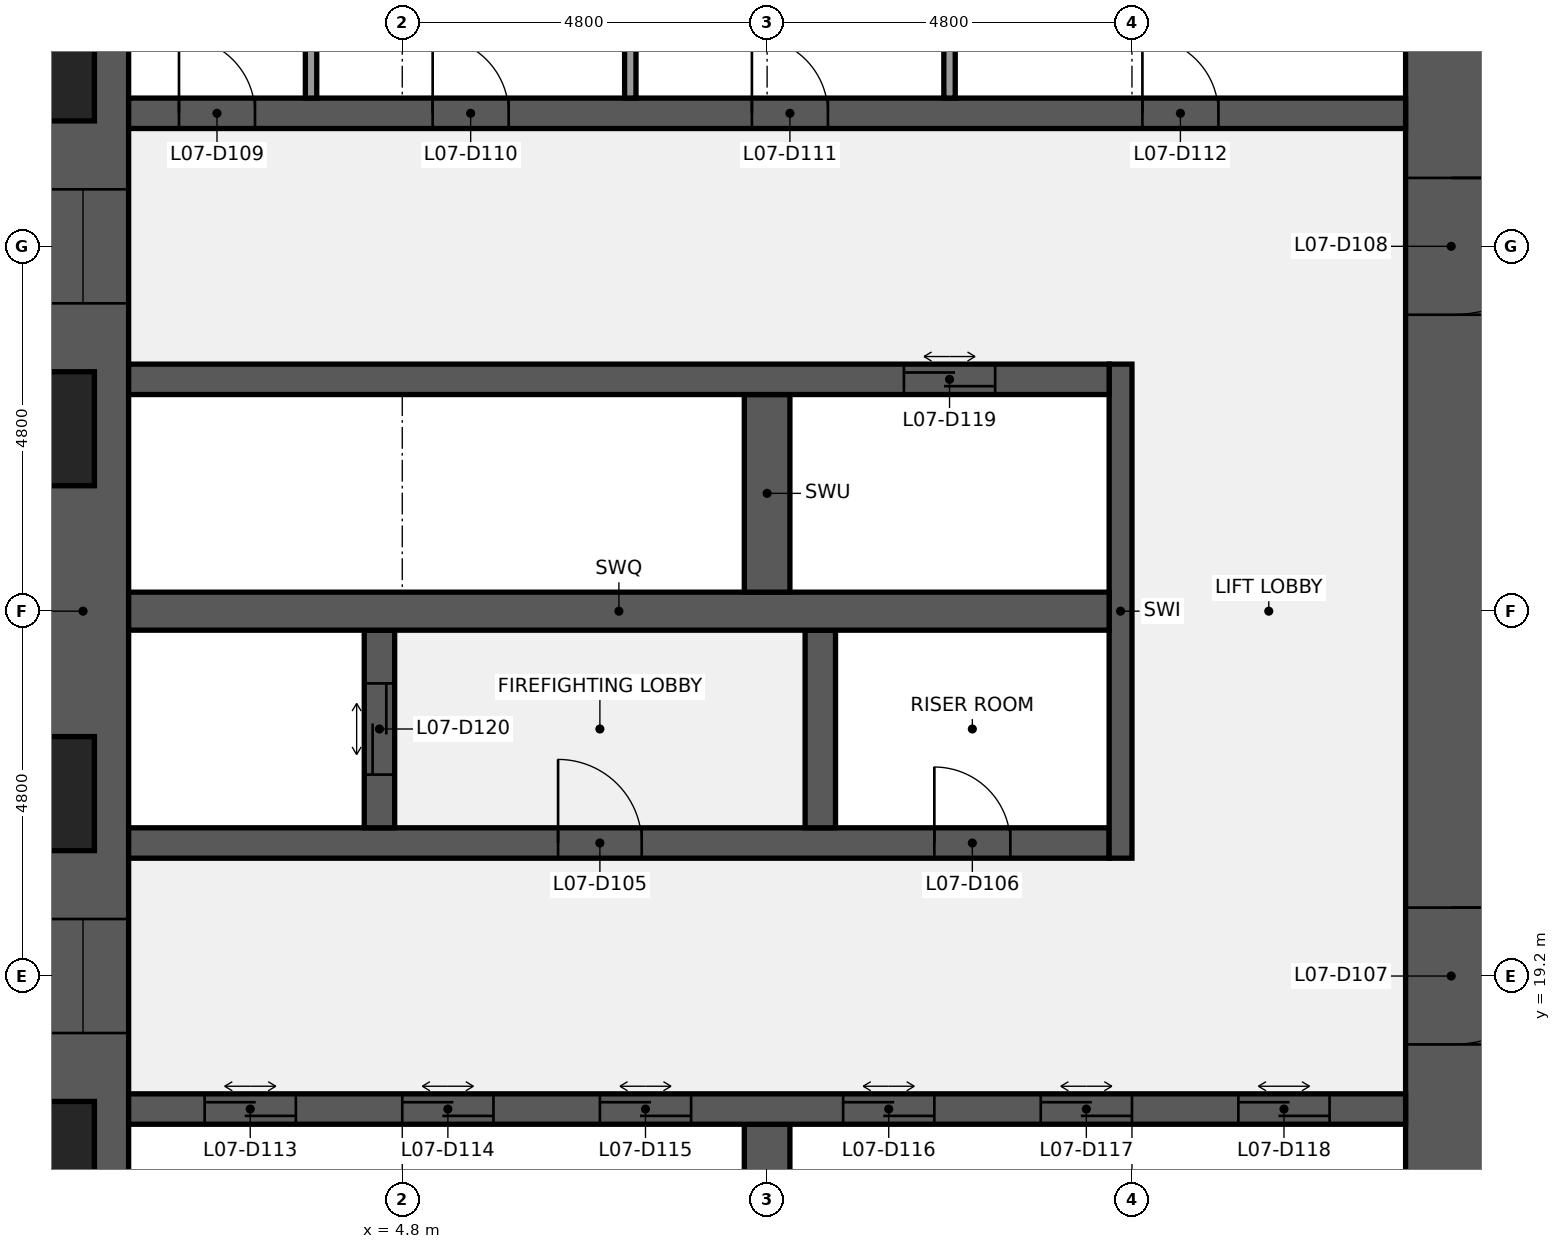
"""IFC4 building model, lengths in metres.
Left out: names, types, materials, properties, quantities, classifications, styles, units other than length and angle.
Written with IfcOpenShell. Run it as: python <this file> out.ifc"""

import sys

from ifc_helpers import new_model, si_unit, direction, frame, frame_2d, origin, place, context, subcontext, project, spatial, rectangle, extrude, element, fill, save


model = new_model("IFC4")
c1 = context("Model", 3, precision=1e-05, world=origin(), true_north=direction((0.0, 1.0)))
c2 = subcontext(c1, "Body", "Model", "MODEL_VIEW")
j1 = project(units=[si_unit("LENGTHUNIT", "METRE"), si_unit("PLANEANGLEUNIT", "RADIAN")], contexts=[c1])
p1 = place(None, origin())
s1 = spatial("IfcSite", under=j1, at=p1, CompositionType="ELEMENT")
p2 = place(p1, origin())
s2 = spatial("IfcBuilding", under=s1, at=p2, CompositionType="ELEMENT")
p3 = place(p2, frame((0.0, 0.0, 39.0)))
s3 = spatial("IfcBuildingStorey", under=s2, at=p3, CompositionType="ELEMENT", Elevation=39.0)
p4 = place(p3, frame((0.6, 9.6, 0.0), z_axis=(0.0, 0.0, 1.0), x_axis=(0.0, 1.0, 0.0)))
e1 = element("IfcWall", 1, at=p4, inside=s3, PredefinedType="SHEAR", context=c2, shape_type="SweptSolid", body=[
    extrude(rectangle(XDim=28.8, YDim=1.2, at=frame_2d((14.4, 0.0))), origin(), (0.0, 0.0, 1.0), 3.84),
])
p5 = place(p4, frame((8.85, 0.0, 0.9)))
e2 = element("IfcOpeningElement", 2, at=p5, cuts=e1, PredefinedType="OPENING", context=c2, shape_type="SweptSolid", body=[
    extrude(rectangle(XDim=1.5, YDim=1.5, at=frame_2d((0.75, 0.75))), frame((0.0, 0.61, 0.0), z_axis=(0.0, -1.0, 0.0), x_axis=(1.0, 0.0, 0.0)), (0.0, 0.0, 1.0), 1.22),
])
p6 = place(p4, frame((18.45, 0.0, 0.9)))
e3 = element("IfcOpeningElement", 3, at=p6, cuts=e1, PredefinedType="OPENING", context=c2, shape_type="SweptSolid", body=[
    extrude(rectangle(XDim=1.5, YDim=1.5, at=frame_2d((0.75, 0.75))), frame((0.0, 0.61, 0.0), z_axis=(0.0, -1.0, 0.0), x_axis=(1.0, 0.0, 0.0)), (0.0, 0.0, 1.0), 1.22),
])
p7 = place(p3, frame((18.6, 38.4, 0.0), z_axis=(0.0, 0.0, 1.0), x_axis=(0.0, -1.0, 0.0)))
e4 = element("IfcWall", 4, at=p7, inside=s3, PredefinedType="SHEAR", context=c2, shape_type="SweptSolid", body=[
    extrude(rectangle(XDim=28.8, YDim=1.2, at=frame_2d((14.4, 0.0))), origin(), (0.0, 0.0, 1.0), 3.84),
])
p8 = place(p7, frame((18.3, 0.0, 0.0)))
e5 = element("IfcOpeningElement", 5, at=p8, cuts=e4, PredefinedType="OPENING", context=c2, shape_type="SweptSolid", body=[
    extrude(rectangle(XDim=1.8, YDim=2.1, at=frame_2d((0.9, 1.05))), frame((0.0, 0.61, 0.0), z_axis=(0.0, -1.0, 0.0), x_axis=(1.0, 0.0, 0.0)), (0.0, 0.0, 1.0), 1.22),
])
p9 = place(p7, frame((8.7, 0.0, 0.0)))
e6 = element("IfcOpeningElement", 6, at=p9, cuts=e4, PredefinedType="OPENING", context=c2, shape_type="SweptSolid", body=[
    extrude(rectangle(XDim=1.8, YDim=2.1, at=frame_2d((0.9, 1.05))), frame((0.0, 0.61, 0.0), z_axis=(0.0, -1.0, 0.0), x_axis=(1.0, 0.0, 0.0)), (0.0, 0.0, 1.0), 1.22),
])
p10 = place(p3, frame((9.6, 14.65, 0.0), z_axis=(0.0, 0.0, 1.0), x_axis=(0.0, 1.0, 0.0)))
e7 = element("IfcWall", 7, at=p10, inside=s3, PredefinedType="SHEAR", context=c2, shape_type="SweptSolid", body=[
    extrude(rectangle(XDim=2.6, YDim=0.6, at=frame_2d((1.3, 0.0))), origin(), (0.0, 0.0, 1.0), 3.84),
])
p11 = place(p3, frame((1.2, 17.45, 0.0), z_axis=(0.0, 0.0, 1.0), x_axis=(1.0, 0.0, 0.0)))
e8 = element("IfcWall", 8, at=p11, inside=s3, PredefinedType="SHEAR", context=c2, shape_type="SweptSolid", body=[
    extrude(rectangle(XDim=16.8, YDim=0.4, at=frame_2d((8.4, 0.0))), origin(), (0.0, 0.0, 1.0), 3.84),
])
p12 = place(p11, frame((1.0, 0.0, 0.0)))
e9 = element("IfcOpeningElement", 9, at=p12, cuts=e8, PredefinedType="OPENING", context=c2, shape_type="SweptSolid", body=[
    extrude(rectangle(XDim=1.2, YDim=2.1, at=frame_2d((0.6, 1.05))), frame((0.0, 0.21, 0.0), z_axis=(0.0, -1.0, 0.0), x_axis=(1.0, 0.0, 0.0)), (0.0, 0.0, 1.0), 0.42),
])
p13 = place(p11, frame((3.6, 0.0, 0.0)))
e10 = element("IfcOpeningElement", 10, at=p13, cuts=e8, PredefinedType="OPENING", context=c2, shape_type="SweptSolid", body=[
    extrude(rectangle(XDim=1.2, YDim=2.1, at=frame_2d((0.6, 1.05))), frame((0.0, 0.21, 0.0), z_axis=(0.0, -1.0, 0.0), x_axis=(1.0, 0.0, 0.0)), (0.0, 0.0, 1.0), 0.42),
])
p14 = place(p11, frame((6.2, 0.0, 0.0)))
e11 = element("IfcOpeningElement", 11, at=p14, cuts=e8, PredefinedType="OPENING", context=c2, shape_type="SweptSolid", body=[
    extrude(rectangle(XDim=1.2, YDim=2.1, at=frame_2d((0.6, 1.05))), frame((0.0, 0.21, 0.0), z_axis=(0.0, -1.0, 0.0), x_axis=(1.0, 0.0, 0.0)), (0.0, 0.0, 1.0), 0.42),
])
p15 = place(p11, frame((9.4, 0.0, 0.0)))
e12 = element("IfcOpeningElement", 12, at=p15, cuts=e8, PredefinedType="OPENING", context=c2, shape_type="SweptSolid", body=[
    extrude(rectangle(XDim=1.2, YDim=2.1, at=frame_2d((0.6, 1.05))), frame((0.0, 0.21, 0.0), z_axis=(0.0, -1.0, 0.0), x_axis=(1.0, 0.0, 0.0)), (0.0, 0.0, 1.0), 0.42),
])
p16 = place(p11, frame((12.0, 0.0, 0.0)))
e13 = element("IfcOpeningElement", 13, at=p16, cuts=e8, PredefinedType="OPENING", context=c2, shape_type="SweptSolid", body=[
    extrude(rectangle(XDim=1.2, YDim=2.1, at=frame_2d((0.6, 1.05))), frame((0.0, 0.21, 0.0), z_axis=(0.0, -1.0, 0.0), x_axis=(1.0, 0.0, 0.0)), (0.0, 0.0, 1.0), 0.42),
])
p17 = place(p11, frame((14.6, 0.0, 0.0)))
e14 = element("IfcOpeningElement", 14, at=p17, cuts=e8, PredefinedType="OPENING", context=c2, shape_type="SweptSolid", body=[
    extrude(rectangle(XDim=1.2, YDim=2.1, at=frame_2d((0.6, 1.05))), frame((0.0, 0.21, 0.0), z_axis=(0.0, -1.0, 0.0), x_axis=(1.0, 0.0, 0.0)), (0.0, 0.0, 1.0), 0.42),
])
p18 = place(p3, frame((1.2, 20.95, 0.0), z_axis=(0.0, 0.0, 1.0), x_axis=(1.0, 0.0, 0.0)))
e15 = element("IfcWall", 15, at=p18, inside=s3, PredefinedType="SHEAR", context=c2, shape_type="SweptSolid", body=[
    extrude(rectangle(XDim=12.9, YDim=0.4, at=frame_2d((6.45, 0.0))), origin(), (0.0, 0.0, 1.0), 3.84),
])
p19 = place(p18, frame((5.65, 0.0, 0.0)))
e16 = element("IfcOpeningElement", 16, at=p19, cuts=e15, PredefinedType="OPENING", context=c2, shape_type="SweptSolid", body=[
    extrude(rectangle(XDim=1.1, YDim=2.1, at=frame_2d((0.55, 1.05))), frame((0.0, 0.21, 0.0), z_axis=(0.0, -1.0, 0.0), x_axis=(1.0, 0.0, 0.0)), (0.0, 0.0, 1.0), 0.42),
])
p20 = place(p18, frame((10.6, 0.0, 0.0)))
e17 = element("IfcOpeningElement", 17, at=p20, cuts=e15, PredefinedType="OPENING", context=c2, shape_type="SweptSolid", body=[
    extrude(rectangle(XDim=1.0, YDim=2.1, at=frame_2d((0.5, 1.05))), frame((0.0, 0.21, 0.0), z_axis=(0.0, -1.0, 0.0), x_axis=(1.0, 0.0, 0.0)), (0.0, 0.0, 1.0), 0.42),
])
p21 = place(p3, frame((14.25, 20.75, 0.0), z_axis=(0.0, 0.0, 1.0), x_axis=(0.0, 1.0, 0.0)))
e18 = element("IfcWall", 18, at=p21, inside=s3, PredefinedType="SHEAR", context=c2, shape_type="SweptSolid", body=[
    extrude(rectangle(XDim=6.5, YDim=0.3, at=frame_2d((3.25, 0.0))), origin(), (0.0, 0.0, 1.0), 3.84),
])
p22 = place(p3, frame((4.5, 21.15, 0.0), z_axis=(0.0, 0.0, 1.0), x_axis=(0.0, 1.0, 0.0)))
e19 = element("IfcWall", 19, at=p22, inside=s3, PredefinedType="SHEAR", context=c2, shape_type="SweptSolid", body=[
    extrude(rectangle(XDim=2.6, YDim=0.4, at=frame_2d((1.3, 0.0))), origin(), (0.0, 0.0, 1.0), 3.84),
])
p23 = place(p22, frame((0.7, 0.0, 0.0)))
e20 = element("IfcOpeningElement", 20, at=p23, cuts=e19, PredefinedType="OPENING", context=c2, shape_type="SweptSolid", body=[
    extrude(rectangle(XDim=1.2, YDim=2.1, at=frame_2d((0.6, 1.05))), frame((0.0, 0.21, 0.0), z_axis=(0.0, -1.0, 0.0), x_axis=(1.0, 0.0, 0.0)), (0.0, 0.0, 1.0), 0.42),
])
p24 = place(p3, frame((10.3, 21.15, 0.0), z_axis=(0.0, 0.0, 1.0), x_axis=(0.0, 1.0, 0.0)))
e21 = element("IfcWall", 21, at=p24, inside=s3, PredefinedType="SHEAR", context=c2, shape_type="SweptSolid", body=[
    extrude(rectangle(XDim=2.6, YDim=0.4, at=frame_2d((1.3, 0.0))), origin(), (0.0, 0.0, 1.0), 3.84),
])
p25 = place(p3, frame((1.2, 24.0, 0.0), z_axis=(0.0, 0.0, 1.0), x_axis=(1.0, 0.0, 0.0)))
e22 = element("IfcWall", 22, at=p25, inside=s3, PredefinedType="SHEAR", context=c2, shape_type="SweptSolid", body=[
    extrude(rectangle(XDim=12.9, YDim=0.5, at=frame_2d((6.45, 0.0))), origin(), (0.0, 0.0, 1.0), 3.84),
])
p26 = place(p3, frame((9.6, 24.25, 0.0), z_axis=(0.0, 0.0, 1.0), x_axis=(0.0, 1.0, 0.0)))
e23 = element("IfcWall", 23, at=p26, inside=s3, PredefinedType="SHEAR", context=c2, shape_type="SweptSolid", body=[
    extrude(rectangle(XDim=2.6, YDim=0.6, at=frame_2d((1.3, 0.0))), origin(), (0.0, 0.0, 1.0), 3.84),
])
p27 = place(p3, frame((1.2, 27.05, 0.0), z_axis=(0.0, 0.0, 1.0), x_axis=(1.0, 0.0, 0.0)))
e24 = element("IfcWall", 24, at=p27, inside=s3, PredefinedType="SHEAR", context=c2, shape_type="SweptSolid", body=[
    extrude(rectangle(XDim=12.9, YDim=0.4, at=frame_2d((6.45, 0.0))), origin(), (0.0, 0.0, 1.0), 3.84),
])
p28 = place(p27, frame((10.2, 0.0, 0.0)))
e25 = element("IfcOpeningElement", 25, at=p28, cuts=e24, PredefinedType="OPENING", context=c2, shape_type="SweptSolid", body=[
    extrude(rectangle(XDim=1.2, YDim=2.1, at=frame_2d((0.6, 1.05))), frame((0.0, 0.21, 0.0), z_axis=(0.0, -1.0, 0.0), x_axis=(1.0, 0.0, 0.0)), (0.0, 0.0, 1.0), 0.42),
])
p29 = place(p3, frame((1.2, 30.55, 0.0), z_axis=(0.0, 0.0, 1.0), x_axis=(1.0, 0.0, 0.0)))
e26 = element("IfcWall", 26, at=p29, inside=s3, PredefinedType="SHEAR", context=c2, shape_type="SweptSolid", body=[
    extrude(rectangle(XDim=16.8, YDim=0.4, at=frame_2d((8.4, 0.0))), origin(), (0.0, 0.0, 1.0), 3.84),
])
p30 = place(p29, frame((0.663, 0.0, 0.0)))
e27 = element("IfcOpeningElement", 27, at=p30, cuts=e26, PredefinedType="OPENING", context=c2, shape_type="SweptSolid", body=[
    extrude(rectangle(XDim=1.0, YDim=2.1, at=frame_2d((0.5, 1.05))), frame((0.0, 0.21, 0.0), z_axis=(0.0, -1.0, 0.0), x_axis=(1.0, 0.0, 0.0)), (0.0, 0.0, 1.0), 0.42),
])
p31 = place(p29, frame((4.0, 0.0, 0.0)))
e28 = element("IfcOpeningElement", 28, at=p31, cuts=e26, PredefinedType="OPENING", context=c2, shape_type="SweptSolid", body=[
    extrude(rectangle(XDim=1.0, YDim=2.1, at=frame_2d((0.5, 1.05))), frame((0.0, 0.21, 0.0), z_axis=(0.0, -1.0, 0.0), x_axis=(1.0, 0.0, 0.0)), (0.0, 0.0, 1.0), 0.42),
])
p32 = place(p29, frame((8.2, 0.0, 0.0)))
e29 = element("IfcOpeningElement", 29, at=p32, cuts=e26, PredefinedType="OPENING", context=c2, shape_type="SweptSolid", body=[
    extrude(rectangle(XDim=1.0, YDim=2.1, at=frame_2d((0.5, 1.05))), frame((0.0, 0.21, 0.0), z_axis=(0.0, -1.0, 0.0), x_axis=(1.0, 0.0, 0.0)), (0.0, 0.0, 1.0), 0.42),
])
p33 = place(p29, frame((13.337, 0.0, 0.0)))
e30 = element("IfcOpeningElement", 30, at=p33, cuts=e26, PredefinedType="OPENING", context=c2, shape_type="SweptSolid", body=[
    extrude(rectangle(XDim=1.0, YDim=2.1, at=frame_2d((0.5, 1.05))), frame((0.0, 0.21, 0.0), z_axis=(0.0, -1.0, 0.0), x_axis=(1.0, 0.0, 0.0)), (0.0, 0.0, 1.0), 0.42),
])
for number, where, z_axis, x_axis in (
    (31, (3.6, 30.75, 0.0), (0.0, 0.0, 1.0), (0.0, 1.0, 0.0)),
    (32, (7.8, 30.75, 0.0), (0.0, 0.0, 1.0), (0.0, 1.0, 0.0)),
    (33, (12.0, 30.75, 0.0), (0.0, 0.0, 1.0), (0.0, 1.0, 0.0)),
):
    element("IfcWall", number, at=place(p3, frame(where, z_axis=z_axis, x_axis=x_axis)), inside=s3, PredefinedType="PARTITIONING", context=c2, shape_type="SweptSolid", body=[
        extrude(rectangle(XDim=2.6, YDim=0.15, at=frame_2d((1.3, 0.0))), origin(), (0.0, 0.0, 1.0), 3.84),
    ])
p34 = place(p19, origin())
e34 = element("IfcDoor", 34, at=p34, inside=s3, OperationType="SINGLE_SWING_LEFT", PredefinedType="DOOR", context=c2, shape_type="SweptSolid", body=[
    extrude(rectangle(XDim=1.1, YDim=2.1, at=frame_2d((0.55, 1.05))), frame((0.0, 0.025, 0.0), z_axis=(0.0, -1.0, 0.0), x_axis=(1.0, 0.0, 0.0)), (0.0, 0.0, 1.0), 0.05),
])
fill(e16, e34)
p35 = place(p20, origin())
e35 = element("IfcDoor", 35, at=p35, inside=s3, OperationType="SINGLE_SWING_LEFT", PredefinedType="DOOR", context=c2, shape_type="SweptSolid", body=[
    extrude(rectangle(XDim=1.0, YDim=2.1, at=frame_2d((0.5, 1.05))), frame((0.0, 0.025, 0.0), z_axis=(0.0, -1.0, 0.0), x_axis=(1.0, 0.0, 0.0)), (0.0, 0.0, 1.0), 0.05),
])
fill(e17, e35)
p36 = place(p8, origin())
e36 = element("IfcDoor", 36, at=p36, inside=s3, OperationType="DOUBLE_DOOR_SINGLE_SWING", PredefinedType="DOOR", context=c2, shape_type="SweptSolid", body=[
    extrude(rectangle(XDim=1.8, YDim=2.1, at=frame_2d((0.9, 1.05))), frame((0.0, 0.025, 0.0), z_axis=(0.0, -1.0, 0.0), x_axis=(1.0, 0.0, 0.0)), (0.0, 0.0, 1.0), 0.05),
])
fill(e5, e36)
p37 = place(p9, origin())
e37 = element("IfcDoor", 37, at=p37, inside=s3, OperationType="DOUBLE_DOOR_SINGLE_SWING", PredefinedType="DOOR", context=c2, shape_type="SweptSolid", body=[
    extrude(rectangle(XDim=1.8, YDim=2.1, at=frame_2d((0.9, 1.05))), frame((0.0, 0.025, 0.0), z_axis=(0.0, -1.0, 0.0), x_axis=(1.0, 0.0, 0.0)), (0.0, 0.0, 1.0), 0.05),
])
fill(e6, e37)
p38 = place(p30, origin())
e38 = element("IfcDoor", 38, at=p38, inside=s3, OperationType="SINGLE_SWING_LEFT", PredefinedType="DOOR", context=c2, shape_type="SweptSolid", body=[
    extrude(rectangle(XDim=1.0, YDim=2.1, at=frame_2d((0.5, 1.05))), frame((0.0, 0.025, 0.0), z_axis=(0.0, -1.0, 0.0), x_axis=(1.0, 0.0, 0.0)), (0.0, 0.0, 1.0), 0.05),
])
fill(e27, e38)
p39 = place(p31, origin())
e39 = element("IfcDoor", 39, at=p39, inside=s3, OperationType="SINGLE_SWING_LEFT", PredefinedType="DOOR", context=c2, shape_type="SweptSolid", body=[
    extrude(rectangle(XDim=1.0, YDim=2.1, at=frame_2d((0.5, 1.05))), frame((0.0, 0.025, 0.0), z_axis=(0.0, -1.0, 0.0), x_axis=(1.0, 0.0, 0.0)), (0.0, 0.0, 1.0), 0.05),
])
fill(e28, e39)
p40 = place(p32, origin())
e40 = element("IfcDoor", 40, at=p40, inside=s3, OperationType="SINGLE_SWING_LEFT", PredefinedType="DOOR", context=c2, shape_type="SweptSolid", body=[
    extrude(rectangle(XDim=1.0, YDim=2.1, at=frame_2d((0.5, 1.05))), frame((0.0, 0.025, 0.0), z_axis=(0.0, -1.0, 0.0), x_axis=(1.0, 0.0, 0.0)), (0.0, 0.0, 1.0), 0.05),
])
fill(e29, e40)
p41 = place(p33, origin())
e41 = element("IfcDoor", 41, at=p41, inside=s3, OperationType="SINGLE_SWING_LEFT", PredefinedType="DOOR", context=c2, shape_type="SweptSolid", body=[
    extrude(rectangle(XDim=1.0, YDim=2.1, at=frame_2d((0.5, 1.05))), frame((0.0, 0.025, 0.0), z_axis=(0.0, -1.0, 0.0), x_axis=(1.0, 0.0, 0.0)), (0.0, 0.0, 1.0), 0.05),
])
fill(e30, e41)
p42 = place(p12, origin())
e42 = element("IfcDoor", 42, at=p42, inside=s3, OperationType="DOUBLE_DOOR_SLIDING", PredefinedType="DOOR", context=c2, shape_type="SweptSolid", body=[
    extrude(rectangle(XDim=1.2, YDim=2.1, at=frame_2d((0.6, 1.05))), frame((0.0, 0.025, 0.0), z_axis=(0.0, -1.0, 0.0), x_axis=(1.0, 0.0, 0.0)), (0.0, 0.0, 1.0), 0.05),
])
fill(e9, e42)
p43 = place(p13, origin())
e43 = element("IfcDoor", 43, at=p43, inside=s3, OperationType="DOUBLE_DOOR_SLIDING", PredefinedType="DOOR", context=c2, shape_type="SweptSolid", body=[
    extrude(rectangle(XDim=1.2, YDim=2.1, at=frame_2d((0.6, 1.05))), frame((0.0, 0.025, 0.0), z_axis=(0.0, -1.0, 0.0), x_axis=(1.0, 0.0, 0.0)), (0.0, 0.0, 1.0), 0.05),
])
fill(e10, e43)
p44 = place(p14, origin())
e44 = element("IfcDoor", 44, at=p44, inside=s3, OperationType="DOUBLE_DOOR_SLIDING", PredefinedType="DOOR", context=c2, shape_type="SweptSolid", body=[
    extrude(rectangle(XDim=1.2, YDim=2.1, at=frame_2d((0.6, 1.05))), frame((0.0, 0.025, 0.0), z_axis=(0.0, -1.0, 0.0), x_axis=(1.0, 0.0, 0.0)), (0.0, 0.0, 1.0), 0.05),
])
fill(e11, e44)
p45 = place(p15, origin())
e45 = element("IfcDoor", 45, at=p45, inside=s3, OperationType="DOUBLE_DOOR_SLIDING", PredefinedType="DOOR", context=c2, shape_type="SweptSolid", body=[
    extrude(rectangle(XDim=1.2, YDim=2.1, at=frame_2d((0.6, 1.05))), frame((0.0, 0.025, 0.0), z_axis=(0.0, -1.0, 0.0), x_axis=(1.0, 0.0, 0.0)), (0.0, 0.0, 1.0), 0.05),
])
fill(e12, e45)
p46 = place(p16, origin())
e46 = element("IfcDoor", 46, at=p46, inside=s3, OperationType="DOUBLE_DOOR_SLIDING", PredefinedType="DOOR", context=c2, shape_type="SweptSolid", body=[
    extrude(rectangle(XDim=1.2, YDim=2.1, at=frame_2d((0.6, 1.05))), frame((0.0, 0.025, 0.0), z_axis=(0.0, -1.0, 0.0), x_axis=(1.0, 0.0, 0.0)), (0.0, 0.0, 1.0), 0.05),
])
fill(e13, e46)
p47 = place(p17, origin())
e47 = element("IfcDoor", 47, at=p47, inside=s3, OperationType="DOUBLE_DOOR_SLIDING", PredefinedType="DOOR", context=c2, shape_type="SweptSolid", body=[
    extrude(rectangle(XDim=1.2, YDim=2.1, at=frame_2d((0.6, 1.05))), frame((0.0, 0.025, 0.0), z_axis=(0.0, -1.0, 0.0), x_axis=(1.0, 0.0, 0.0)), (0.0, 0.0, 1.0), 0.05),
])
fill(e14, e47)
p48 = place(p28, origin())
e48 = element("IfcDoor", 48, at=p48, inside=s3, OperationType="DOUBLE_DOOR_SLIDING", PredefinedType="DOOR", context=c2, shape_type="SweptSolid", body=[
    extrude(rectangle(XDim=1.2, YDim=2.1, at=frame_2d((0.6, 1.05))), frame((0.0, 0.025, 0.0), z_axis=(0.0, -1.0, 0.0), x_axis=(1.0, 0.0, 0.0)), (0.0, 0.0, 1.0), 0.05),
])
fill(e25, e48)
p49 = place(p23, origin())
e49 = element("IfcDoor", 49, at=p49, inside=s3, OperationType="DOUBLE_DOOR_SLIDING", PredefinedType="DOOR", context=c2, shape_type="SweptSolid", body=[
    extrude(rectangle(XDim=1.2, YDim=2.1, at=frame_2d((0.6, 1.05))), frame((0.0, 0.025, 0.0), z_axis=(0.0, -1.0, 0.0), x_axis=(1.0, 0.0, 0.0)), (0.0, 0.0, 1.0), 0.05),
])
fill(e20, e49)
p50 = place(p5, origin())
e50 = element("IfcWindow", 50, at=p50, inside=s3, PartitioningType="SINGLE_PANEL", PredefinedType="WINDOW", context=c2, shape_type="SweptSolid", body=[
    extrude(rectangle(XDim=1.5, YDim=1.5, at=frame_2d((0.75, 0.75))), frame((0.0, 0.03, 0.0), z_axis=(0.0, -1.0, 0.0), x_axis=(1.0, 0.0, 0.0)), (0.0, 0.0, 1.0), 0.06),
])
fill(e2, e50)
p51 = place(p6, origin())
e51 = element("IfcWindow", 51, at=p51, inside=s3, PartitioningType="SINGLE_PANEL", PredefinedType="WINDOW", context=c2, shape_type="SweptSolid", body=[
    extrude(rectangle(XDim=1.5, YDim=1.5, at=frame_2d((0.75, 0.75))), frame((0.0, 0.03, 0.0), z_axis=(0.0, -1.0, 0.0), x_axis=(1.0, 0.0, 0.0)), (0.0, 0.0, 1.0), 0.06),
])
fill(e3, e51)
save(model, sys.argv[1])
